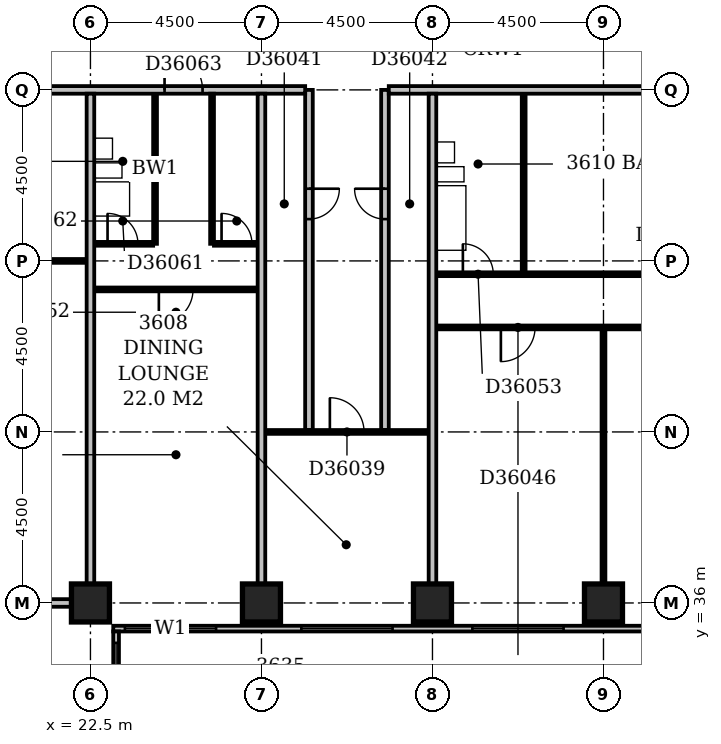
"""IFC4 building model, lengths in metres.
Left out: names, types, materials, properties, quantities, classifications, styles, units other than length and angle.
Written with IfcOpenShell. Run it as: python <this file> out.ifc"""

import sys

from ifc_helpers import new_model, si_unit, direction, frame, frame_2d, origin, origin_2d, place, context, subcontext, project, spatial, rectangle, extrude, element, fill, save


model = new_model("IFC4")
c1 = context("Model", 3, precision=1e-05, world=origin(), true_north=direction((0.0, 1.0)))
c2 = subcontext(c1, "Body", "Model", "MODEL_VIEW")
j1 = project(units=[si_unit("LENGTHUNIT", "METRE"), si_unit("PLANEANGLEUNIT", "RADIAN")], contexts=[c1])
p1 = place(None, origin())
s1 = spatial("IfcSite", under=j1, at=p1, CompositionType="ELEMENT")
p2 = place(p1, origin())
s2 = spatial("IfcBuilding", under=s1, at=p2, CompositionType="ELEMENT")
p3 = place(p2, frame((0.0, 0.0, 144.8)))
s3 = spatial("IfcBuildingStorey", under=s2, at=p3, CompositionType="ELEMENT", Elevation=144.8)
for number, where, z_axis, x_axis in (
    (1, (22.5, 36.0, -0.3), (0.0, 0.0, 1.0), (1.0, 0.0, 0.0)),
    (2, (27.0, 36.0, -0.3), (0.0, 0.0, 1.0), (1.0, 0.0, 0.0)),
    (3, (31.5, 36.0, -0.3), (0.0, 0.0, 1.0), (1.0, 0.0, 0.0)),
    (4, (36.0, 36.0, -0.3), (0.0, 0.0, 1.0), (1.0, 0.0, 0.0)),
):
    element("IfcColumn", number, at=place(p3, frame(where, z_axis=z_axis, x_axis=x_axis)), inside=s3, PredefinedType="COLUMN", context=c2, shape_type="SweptSolid", body=[
        extrude(rectangle(XDim=1.0, YDim=1.0, at=origin_2d()), origin(), (0.0, 0.0, 1.0), 3.6),
    ])
p4 = place(p3, frame((23.175, 17.4, 0.0), z_axis=(0.0, 0.0, 1.0), x_axis=(0.0, 1.0, 0.0)))
e5 = element("IfcWall", 5, at=p4, inside=s3, PredefinedType="STANDARD", context=c2, shape_type="SweptSolid", body=[
    extrude(rectangle(XDim=17.85, YDim=0.15, at=frame_2d((8.925, 0.0))), origin(), (0.0, 0.0, 1.0), 2.7),
])
p5 = place(p4, frame((1.432, 0.0, 0.6)))
e6 = element("IfcOpeningElement", 6, at=p5, cuts=e5, PredefinedType="OPENING", context=c2, shape_type="SweptSolid", body=[
    extrude(rectangle(XDim=2.4, YDim=1.8, at=frame_2d((1.2, 0.9))), frame((0.0, 0.087, 0.0), z_axis=(0.0, -1.0, 0.0), x_axis=(1.0, 0.0, 0.0)), (0.0, 0.0, 1.0), 0.174),
])
p6 = place(p4, frame((6.15, 0.0, 0.6)))
e7 = element("IfcOpeningElement", 7, at=p6, cuts=e5, PredefinedType="OPENING", context=c2, shape_type="SweptSolid", body=[
    extrude(rectangle(XDim=2.4, YDim=1.8, at=frame_2d((1.2, 0.9))), frame((0.0, 0.087, 0.0), z_axis=(0.0, -1.0, 0.0), x_axis=(1.0, 0.0, 0.0)), (0.0, 0.0, 1.0), 0.174),
])
p7 = place(p4, frame((10.65, 0.0, 0.6)))
e8 = element("IfcOpeningElement", 8, at=p7, cuts=e5, PredefinedType="OPENING", context=c2, shape_type="SweptSolid", body=[
    extrude(rectangle(XDim=2.4, YDim=1.8, at=frame_2d((1.2, 0.9))), frame((0.0, 0.087, 0.0), z_axis=(0.0, -1.0, 0.0), x_axis=(1.0, 0.0, 0.0)), (0.0, 0.0, 1.0), 0.174),
])
p8 = place(p4, frame((15.15, 0.0, 0.6)))
e9 = element("IfcOpeningElement", 9, at=p8, cuts=e5, PredefinedType="OPENING", context=c2, shape_type="SweptSolid", body=[
    extrude(rectangle(XDim=2.4, YDim=1.8, at=frame_2d((1.2, 0.9))), frame((0.0, 0.087, 0.0), z_axis=(0.0, -1.0, 0.0), x_axis=(1.0, 0.0, 0.0)), (0.0, 0.0, 1.0), 0.174),
])
p9 = place(p3, frame((23.1, 35.325, 0.0), z_axis=(0.0, 0.0, 1.0), x_axis=(1.0, 0.0, 0.0)))
e10 = element("IfcWall", 10, at=p9, inside=s3, PredefinedType="STANDARD", context=c2, shape_type="SweptSolid", body=[
    extrude(rectangle(XDim=45.15, YDim=0.15, at=frame_2d((22.575, 0.0))), origin(), (0.0, 0.0, 1.0), 2.7),
])
p10 = place(p9, frame((0.306, 0.0, 0.6)))
e11 = element("IfcOpeningElement", 11, at=p10, cuts=e10, PredefinedType="OPENING", context=c2, shape_type="SweptSolid", body=[
    extrude(rectangle(XDim=2.4, YDim=1.8, at=frame_2d((1.2, 0.9))), frame((0.0, 0.087, 0.0), z_axis=(0.0, -1.0, 0.0), x_axis=(1.0, 0.0, 0.0)), (0.0, 0.0, 1.0), 0.174),
])
p11 = place(p9, frame((4.95, 0.0, 0.6)))
e12 = element("IfcOpeningElement", 12, at=p11, cuts=e10, PredefinedType="OPENING", context=c2, shape_type="SweptSolid", body=[
    extrude(rectangle(XDim=2.4, YDim=1.8, at=frame_2d((1.2, 0.9))), frame((0.0, 0.087, 0.0), z_axis=(0.0, -1.0, 0.0), x_axis=(1.0, 0.0, 0.0)), (0.0, 0.0, 1.0), 0.174),
])
p12 = place(p9, frame((9.45, 0.0, 0.6)))
e13 = element("IfcOpeningElement", 13, at=p12, cuts=e10, PredefinedType="OPENING", context=c2, shape_type="SweptSolid", body=[
    extrude(rectangle(XDim=2.4, YDim=1.8, at=frame_2d((1.2, 0.9))), frame((0.0, 0.087, 0.0), z_axis=(0.0, -1.0, 0.0), x_axis=(1.0, 0.0, 0.0)), (0.0, 0.0, 1.0), 0.174),
])
p13 = place(p9, frame((13.95, 0.0, 0.6)))
e14 = element("IfcOpeningElement", 14, at=p13, cuts=e10, PredefinedType="OPENING", context=c2, shape_type="SweptSolid", body=[
    extrude(rectangle(XDim=2.4, YDim=1.8, at=frame_2d((1.2, 0.9))), frame((0.0, 0.087, 0.0), z_axis=(0.0, -1.0, 0.0), x_axis=(1.0, 0.0, 0.0)), (0.0, 0.0, 1.0), 0.174),
])
p14 = place(p9, frame((18.45, 0.0, 0.6)))
e15 = element("IfcOpeningElement", 15, at=p14, cuts=e10, PredefinedType="OPENING", context=c2, shape_type="SweptSolid", body=[
    extrude(rectangle(XDim=2.4, YDim=1.8, at=frame_2d((1.2, 0.9))), frame((0.0, 0.087, 0.0), z_axis=(0.0, -1.0, 0.0), x_axis=(1.0, 0.0, 0.0)), (0.0, 0.0, 1.0), 0.174),
])
p15 = place(p9, frame((23.84, 0.0, 0.6)))
e16 = element("IfcOpeningElement", 16, at=p15, cuts=e10, PredefinedType="OPENING", context=c2, shape_type="SweptSolid", body=[
    extrude(rectangle(XDim=1.8, YDim=1.8, at=frame_2d((0.9, 0.9))), frame((0.0, 0.087, 0.0), z_axis=(0.0, -1.0, 0.0), x_axis=(1.0, 0.0, 0.0)), (0.0, 0.0, 1.0), 0.174),
])
p16 = place(p9, frame((27.45, 0.0, 0.6)))
e17 = element("IfcOpeningElement", 17, at=p16, cuts=e10, PredefinedType="OPENING", context=c2, shape_type="SweptSolid", body=[
    extrude(rectangle(XDim=2.4, YDim=1.8, at=frame_2d((1.2, 0.9))), frame((0.0, 0.087, 0.0), z_axis=(0.0, -1.0, 0.0), x_axis=(1.0, 0.0, 0.0)), (0.0, 0.0, 1.0), 0.174),
])
p17 = place(p9, frame((32.27, 0.0, 0.6)))
e18 = element("IfcOpeningElement", 18, at=p17, cuts=e10, PredefinedType="OPENING", context=c2, shape_type="SweptSolid", body=[
    extrude(rectangle(XDim=2.4, YDim=1.8, at=frame_2d((1.2, 0.9))), frame((0.0, 0.087, 0.0), z_axis=(0.0, -1.0, 0.0), x_axis=(1.0, 0.0, 0.0)), (0.0, 0.0, 1.0), 0.174),
])
p18 = place(p9, frame((36.45, 0.0, 0.6)))
e19 = element("IfcOpeningElement", 19, at=p18, cuts=e10, PredefinedType="OPENING", context=c2, shape_type="SweptSolid", body=[
    extrude(rectangle(XDim=2.4, YDim=1.8, at=frame_2d((1.2, 0.9))), frame((0.0, 0.087, 0.0), z_axis=(0.0, -1.0, 0.0), x_axis=(1.0, 0.0, 0.0)), (0.0, 0.0, 1.0), 0.174),
])
p19 = place(p9, frame((40.95, 0.0, 0.6)))
e20 = element("IfcOpeningElement", 20, at=p19, cuts=e10, PredefinedType="OPENING", context=c2, shape_type="SweptSolid", body=[
    extrude(rectangle(XDim=2.4, YDim=1.8, at=frame_2d((1.2, 0.9))), frame((0.0, 0.087, 0.0), z_axis=(0.0, -1.0, 0.0), x_axis=(1.0, 0.0, 0.0)), (0.0, 0.0, 1.0), 0.174),
])
for number, where, z_axis, x_axis in (
    (21, (9.1, 36.0, 0.0), (0.0, 0.0, 1.0), (1.0, 0.0, 0.0)),
    (22, (22.5, 36.5, 0.0), (0.0, 0.0, 1.0), (0.0, 1.0, 0.0)),
):
    element("IfcWall", number, at=place(p3, frame(where, z_axis=z_axis, x_axis=x_axis)), inside=s3, PredefinedType="PARTITIONING", context=c2, shape_type="SweptSolid", body=[
        extrude(rectangle(XDim=12.9, YDim=0.2, at=frame_2d((6.45, 0.0))), origin(), (0.0, 0.0, 1.0), 3.3),
    ])
p20 = place(p3, frame((27.0, 36.5, 0.0), z_axis=(0.0, 0.0, 1.0), x_axis=(0.0, 1.0, 0.0)))
e23 = element("IfcWall", 23, at=p20, inside=s3, PredefinedType="PARTITIONING", context=c2, shape_type="SweptSolid", body=[
    extrude(rectangle(XDim=12.9, YDim=0.2, at=frame_2d((6.45, 0.0))), origin(), (0.0, 0.0, 1.0), 2.6),
])
p21 = place(p3, frame((31.5, 36.5, 0.0), z_axis=(0.0, 0.0, 1.0), x_axis=(0.0, 1.0, 0.0)))
e24 = element("IfcWall", 24, at=p21, inside=s3, PredefinedType="PARTITIONING", context=c2, shape_type="SweptSolid", body=[
    extrude(rectangle(XDim=12.9, YDim=0.2, at=frame_2d((6.45, 0.0))), origin(), (0.0, 0.0, 1.0), 3.3),
])
p22 = place(p3, frame((36.0, 36.5, 0.0), z_axis=(0.0, 0.0, 1.0), x_axis=(0.0, 1.0, 0.0)))
e25 = element("IfcWall", 25, at=p22, inside=s3, PredefinedType="PARTITIONING", context=c2, shape_type="SweptSolid", body=[
    extrude(rectangle(XDim=6.7, YDim=0.1, at=frame_2d((3.35, 0.0))), origin(), (0.0, 0.0, 1.0), 2.4),
])
p23 = place(p3, frame((27.1, 40.5, 0.0), z_axis=(0.0, 0.0, 1.0), x_axis=(1.0, 0.0, 0.0)))
e26 = element("IfcWall", 26, at=p23, inside=s3, PredefinedType="PARTITIONING", context=c2, shape_type="SweptSolid", body=[
    extrude(rectangle(XDim=4.3, YDim=0.1, at=frame_2d((2.15, 0.0))), origin(), (0.0, 0.0, 1.0), 3.3),
])
p24 = place(p23, frame((1.7, 0.0, 0.0)))
e27 = element("IfcOpeningElement", 27, at=p24, cuts=e26, PredefinedType="OPENING", context=c2, shape_type="SweptSolid", body=[
    extrude(rectangle(XDim=0.9, YDim=2.1, at=frame_2d((0.45, 1.05))), frame((0.0, 0.062, 0.0), z_axis=(0.0, -1.0, 0.0), x_axis=(1.0, 0.0, 0.0)), (0.0, 0.0, 1.0), 0.124),
])
p25 = place(p3, frame((28.25, 40.55, 0.0), z_axis=(0.0, 0.0, 1.0), x_axis=(0.0, 1.0, 0.0)))
e28 = element("IfcWall", 28, at=p25, inside=s3, PredefinedType="PARTITIONING", context=c2, shape_type="SweptSolid", body=[
    extrude(rectangle(XDim=8.95, YDim=0.2, at=frame_2d((4.475, 0.0))), origin(), (0.0, 0.0, 1.0), 3.3),
])
p26 = place(p25, frame((5.55, 0.0, 0.0)))
e29 = element("IfcOpeningElement", 29, at=p26, cuts=e28, PredefinedType="OPENING", context=c2, shape_type="SweptSolid", body=[
    extrude(rectangle(XDim=0.8, YDim=2.1, at=frame_2d((0.4, 1.05))), frame((0.0, 0.112, 0.0), z_axis=(0.0, -1.0, 0.0), x_axis=(1.0, 0.0, 0.0)), (0.0, 0.0, 1.0), 0.224),
])
p27 = place(p3, frame((30.25, 40.55, 0.0), z_axis=(0.0, 0.0, 1.0), x_axis=(0.0, 1.0, 0.0)))
e30 = element("IfcWall", 30, at=p27, inside=s3, PredefinedType="PARTITIONING", context=c2, shape_type="SweptSolid", body=[
    extrude(rectangle(XDim=8.95, YDim=0.2, at=frame_2d((4.475, 0.0))), origin(), (0.0, 0.0, 1.0), 3.3),
])
p28 = place(p27, frame((5.55, 0.0, 0.0)))
e31 = element("IfcOpeningElement", 31, at=p28, cuts=e30, PredefinedType="OPENING", context=c2, shape_type="SweptSolid", body=[
    extrude(rectangle(XDim=0.8, YDim=2.1, at=frame_2d((0.4, 1.05))), frame((0.0, 0.112, 0.0), z_axis=(0.0, -1.0, 0.0), x_axis=(1.0, 0.0, 0.0)), (0.0, 0.0, 1.0), 0.224),
])
p29 = place(p3, frame((31.6, 43.25, 0.0), z_axis=(0.0, 0.0, 1.0), x_axis=(1.0, 0.0, 0.0)))
e32 = element("IfcWall", 32, at=p29, inside=s3, PredefinedType="PARTITIONING", context=c2, shape_type="SweptSolid", body=[
    extrude(rectangle(XDim=13.3, YDim=0.1, at=frame_2d((6.65, 0.0))), origin(), (0.0, 0.0, 1.0), 3.3),
])
p30 = place(p29, frame((1.7, 0.0, 0.0)))
e33 = element("IfcOpeningElement", 33, at=p30, cuts=e32, PredefinedType="OPENING", context=c2, shape_type="SweptSolid", body=[
    extrude(rectangle(XDim=0.9, YDim=2.1, at=frame_2d((0.45, 1.05))), frame((0.0, 0.062, 0.0), z_axis=(0.0, -1.0, 0.0), x_axis=(1.0, 0.0, 0.0)), (0.0, 0.0, 1.0), 0.124),
])
p31 = place(p29, frame((6.2, 0.0, 0.0)))
e34 = element("IfcOpeningElement", 34, at=p31, cuts=e32, PredefinedType="OPENING", context=c2, shape_type="SweptSolid", body=[
    extrude(rectangle(XDim=0.9, YDim=2.1, at=frame_2d((0.45, 1.05))), frame((0.0, 0.062, 0.0), z_axis=(0.0, -1.0, 0.0), x_axis=(1.0, 0.0, 0.0)), (0.0, 0.0, 1.0), 0.124),
])
p32 = place(p29, frame((10.7, 0.0, 0.0)))
e35 = element("IfcOpeningElement", 35, at=p32, cuts=e32, PredefinedType="OPENING", context=c2, shape_type="SweptSolid", body=[
    extrude(rectangle(XDim=0.9, YDim=2.1, at=frame_2d((0.45, 1.05))), frame((0.0, 0.062, 0.0), z_axis=(0.0, -1.0, 0.0), x_axis=(1.0, 0.0, 0.0)), (0.0, 0.0, 1.0), 0.124),
])
p33 = place(p3, frame((22.6, 44.25, 0.0), z_axis=(0.0, 0.0, 1.0), x_axis=(1.0, 0.0, 0.0)))
e36 = element("IfcWall", 36, at=p33, inside=s3, PredefinedType="PARTITIONING", context=c2, shape_type="SweptSolid", body=[
    extrude(rectangle(XDim=4.3, YDim=0.1, at=frame_2d((2.15, 0.0))), origin(), (0.0, 0.0, 1.0), 3.3),
])
p34 = place(p33, frame((1.7, 0.0, 0.0)))
e37 = element("IfcOpeningElement", 37, at=p34, cuts=e36, PredefinedType="OPENING", context=c2, shape_type="SweptSolid", body=[
    extrude(rectangle(XDim=0.9, YDim=2.1, at=frame_2d((0.45, 1.05))), frame((0.0, 0.062, 0.0), z_axis=(0.0, -1.0, 0.0), x_axis=(1.0, 0.0, 0.0)), (0.0, 0.0, 1.0), 0.124),
])
p35 = place(p3, frame((31.6, 44.65, 0.0), z_axis=(0.0, 0.0, 1.0), x_axis=(1.0, 0.0, 0.0)))
e38 = element("IfcWall", 38, at=p35, inside=s3, PredefinedType="PARTITIONING", context=c2, shape_type="SweptSolid", body=[
    extrude(rectangle(XDim=10.15, YDim=0.1, at=frame_2d((5.075, 0.0))), origin(), (0.0, 0.0, 1.0), 3.3),
])
p36 = place(p35, frame((0.7, 0.0, 0.0)))
e39 = element("IfcOpeningElement", 39, at=p36, cuts=e38, PredefinedType="OPENING", context=c2, shape_type="SweptSolid", body=[
    extrude(rectangle(XDim=0.8, YDim=2.1, at=frame_2d((0.4, 1.05))), frame((0.0, 0.062, 0.0), z_axis=(0.0, -1.0, 0.0), x_axis=(1.0, 0.0, 0.0)), (0.0, 0.0, 1.0), 0.124),
])
p37 = place(p35, frame((5.8, 0.0, 0.0)))
e40 = element("IfcOpeningElement", 40, at=p37, cuts=e38, PredefinedType="OPENING", context=c2, shape_type="SweptSolid", body=[
    extrude(rectangle(XDim=0.9, YDim=2.1, at=frame_2d((0.45, 1.05))), frame((0.0, 0.062, 0.0), z_axis=(0.0, -1.0, 0.0), x_axis=(1.0, 0.0, 0.0)), (0.0, 0.0, 1.0), 0.124),
])
p38 = place(p3, frame((33.9, 44.7, 0.0), z_axis=(0.0, 0.0, 1.0), x_axis=(0.0, 1.0, 0.0)))
e41 = element("IfcWall", 41, at=p38, inside=s3, PredefinedType="PLUMBINGWALL", context=c2, shape_type="SweptSolid", body=[
    extrude(rectangle(XDim=4.7, YDim=0.1, at=frame_2d((2.35, 0.0))), origin(), (0.0, 0.0, 1.0), 3.3),
])
p39 = place(p3, frame((9.1, 45.0, 0.0), z_axis=(0.0, 0.0, 1.0), x_axis=(1.0, 0.0, 0.0)))
e42 = element("IfcWall", 42, at=p39, inside=s3, PredefinedType="PARTITIONING", context=c2, shape_type="SweptSolid", body=[
    extrude(rectangle(XDim=13.3, YDim=0.1, at=frame_2d((6.65, 0.0))), origin(), (0.0, 0.0, 1.0), 3.3),
])
p40 = place(p3, frame((22.6, 45.45, 0.0), z_axis=(0.0, 0.0, 1.0), x_axis=(1.0, 0.0, 0.0)))
e43 = element("IfcWall", 43, at=p40, inside=s3, PredefinedType="PARTITIONING", context=c2, shape_type="SweptSolid", body=[
    extrude(rectangle(XDim=1.55, YDim=0.1, at=frame_2d((0.775, 0.0))), origin(), (0.0, 0.0, 1.0), 3.3),
])
p41 = place(p40, frame((0.35, 0.0, 0.0)))
e44 = element("IfcOpeningElement", 44, at=p41, cuts=e43, PredefinedType="OPENING", context=c2, shape_type="SweptSolid", body=[
    extrude(rectangle(XDim=0.8, YDim=2.1, at=frame_2d((0.4, 1.05))), frame((0.0, 0.062, 0.0), z_axis=(0.0, -1.0, 0.0), x_axis=(1.0, 0.0, 0.0)), (0.0, 0.0, 1.0), 0.124),
])
p42 = place(p3, frame((24.2, 45.45, 0.0), z_axis=(0.0, 0.0, 1.0), x_axis=(0.0, 1.0, 0.0)))
e45 = element("IfcWall", 45, at=p42, inside=s3, PredefinedType="PLUMBINGWALL", context=c2, shape_type="SweptSolid", body=[
    extrude(rectangle(XDim=3.95, YDim=0.1, at=frame_2d((1.975, 0.0))), origin(), (0.0, 0.0, 1.0), 3.3),
])
p43 = place(p3, frame((25.7, 45.45, 0.0), z_axis=(0.0, 0.0, 1.0), x_axis=(0.0, 1.0, 0.0)))
e46 = element("IfcWall", 46, at=p43, inside=s3, PredefinedType="PARTITIONING", context=c2, shape_type="SweptSolid", body=[
    extrude(rectangle(XDim=3.95, YDim=0.1, at=frame_2d((1.975, 0.0))), origin(), (0.0, 0.0, 1.0), 3.3),
])
p44 = place(p3, frame((25.75, 45.45, 0.0), z_axis=(0.0, 0.0, 1.0), x_axis=(1.0, 0.0, 0.0)))
e47 = element("IfcWall", 47, at=p44, inside=s3, PredefinedType="PARTITIONING", context=c2, shape_type="SweptSolid", body=[
    extrude(rectangle(XDim=1.15, YDim=0.1, at=frame_2d((0.575, 0.0))), origin(), (0.0, 0.0, 1.0), 3.3),
])
p45 = place(p44, frame((0.2, 0.0, 0.0)))
e48 = element("IfcOpeningElement", 48, at=p45, cuts=e47, PredefinedType="OPENING", context=c2, shape_type="SweptSolid", body=[
    extrude(rectangle(XDim=0.8, YDim=2.1, at=frame_2d((0.4, 1.05))), frame((0.0, 0.062, 0.0), z_axis=(0.0, -1.0, 0.0), x_axis=(1.0, 0.0, 0.0)), (0.0, 0.0, 1.0), 0.124),
])
p46 = place(p3, frame((9.1, 49.5, 0.0), z_axis=(0.0, 0.0, 1.0), x_axis=(1.0, 0.0, 0.0)))
e49 = element("IfcWall", 49, at=p46, inside=s3, PredefinedType="PARTITIONING", context=c2, shape_type="SweptSolid", body=[
    extrude(rectangle(XDim=19.05, YDim=0.2, at=frame_2d((9.525, 0.0))), origin(), (0.0, 0.0, 1.0), 3.3),
])
p47 = place(p46, frame((15.35, 0.0, 0.0)))
e50 = element("IfcOpeningElement", 50, at=p47, cuts=e49, PredefinedType="OPENING", context=c2, shape_type="SweptSolid", body=[
    extrude(rectangle(XDim=1.0, YDim=2.1, at=frame_2d((0.5, 1.05))), frame((0.0, 0.112, 0.0), z_axis=(0.0, -1.0, 0.0), x_axis=(1.0, 0.0, 0.0)), (0.0, 0.0, 1.0), 0.224),
])
p48 = place(p46, frame((6.15, 0.0, 0.0)))
e51 = element("IfcOpeningElement", 51, at=p48, cuts=e49, PredefinedType="OPENING", context=c2, shape_type="SweptSolid", body=[
    extrude(rectangle(XDim=0.9, YDim=2.1, at=frame_2d((0.45, 1.05))), frame((0.0, 0.112, 0.0), z_axis=(0.0, -1.0, 0.0), x_axis=(1.0, 0.0, 0.0)), (0.0, 0.0, 1.0), 0.224),
])
p49 = place(p3, frame((30.35, 49.5, 0.0), z_axis=(0.0, 0.0, 1.0), x_axis=(1.0, 0.0, 0.0)))
e52 = element("IfcWall", 52, at=p49, inside=s3, PredefinedType="PARTITIONING", context=c2, shape_type="SweptSolid", body=[
    extrude(rectangle(XDim=15.8, YDim=0.2, at=frame_2d((7.9, 0.0))), origin(), (0.0, 0.0, 1.0), 3.3),
])
p50 = place(p49, frame((11.75, 0.0, 0.0)))
e53 = element("IfcOpeningElement", 53, at=p50, cuts=e52, PredefinedType="OPENING", context=c2, shape_type="SweptSolid", body=[
    extrude(rectangle(XDim=1.0, YDim=2.1, at=frame_2d((0.5, 1.05))), frame((0.0, 0.112, 0.0), z_axis=(0.0, -1.0, 0.0), x_axis=(1.0, 0.0, 0.0)), (0.0, 0.0, 1.0), 0.224),
])
p51 = place(p8, origin())
e54 = element("IfcWindow", 54, at=p51, inside=s3, PartitioningType="SINGLE_PANEL", PredefinedType="WINDOW", context=c2, shape_type="SweptSolid", body=[
    extrude(rectangle(XDim=2.4, YDim=1.8, at=frame_2d((1.2, 0.9))), frame((0.0, 0.03, 0.0), z_axis=(0.0, -1.0, 0.0), x_axis=(1.0, 0.0, 0.0)), (0.0, 0.0, 1.0), 0.06),
])
fill(e9, e54)
p52 = place(p10, origin())
e55 = element("IfcWindow", 55, at=p52, inside=s3, PartitioningType="SINGLE_PANEL", PredefinedType="WINDOW", context=c2, shape_type="SweptSolid", body=[
    extrude(rectangle(XDim=2.4, YDim=1.8, at=frame_2d((1.2, 0.9))), frame((0.0, 0.03, 0.0), z_axis=(0.0, -1.0, 0.0), x_axis=(1.0, 0.0, 0.0)), (0.0, 0.0, 1.0), 0.06),
])
fill(e11, e55)
p53 = place(p11, origin())
e56 = element("IfcWindow", 56, at=p53, inside=s3, PartitioningType="SINGLE_PANEL", PredefinedType="WINDOW", context=c2, shape_type="SweptSolid", body=[
    extrude(rectangle(XDim=2.4, YDim=1.8, at=frame_2d((1.2, 0.9))), frame((0.0, 0.03, 0.0), z_axis=(0.0, -1.0, 0.0), x_axis=(1.0, 0.0, 0.0)), (0.0, 0.0, 1.0), 0.06),
])
fill(e12, e56)
p54 = place(p12, origin())
e57 = element("IfcWindow", 57, at=p54, inside=s3, PartitioningType="SINGLE_PANEL", PredefinedType="WINDOW", context=c2, shape_type="SweptSolid", body=[
    extrude(rectangle(XDim=2.4, YDim=1.8, at=frame_2d((1.2, 0.9))), frame((0.0, 0.03, 0.0), z_axis=(0.0, -1.0, 0.0), x_axis=(1.0, 0.0, 0.0)), (0.0, 0.0, 1.0), 0.06),
])
fill(e13, e57)
p55 = place(p24, origin())
e58 = element("IfcDoor", 58, at=p55, inside=s3, OperationType="SINGLE_SWING_LEFT", PredefinedType="DOOR", context=c2, shape_type="SweptSolid", body=[
    extrude(rectangle(XDim=0.9, YDim=2.1, at=frame_2d((0.45, 1.05))), frame((0.0, 0.025, 0.0), z_axis=(0.0, -1.0, 0.0), x_axis=(1.0, 0.0, 0.0)), (0.0, 0.0, 1.0), 0.05),
])
fill(e27, e58)
p56 = place(p26, origin())
e59 = element("IfcDoor", 59, at=p56, inside=s3, OperationType="SINGLE_SWING_RIGHT", PredefinedType="DOOR", context=c2, shape_type="SweptSolid", body=[
    extrude(rectangle(XDim=0.8, YDim=2.1, at=frame_2d((0.4, 1.05))), frame((0.0, 0.025, 0.0), z_axis=(0.0, -1.0, 0.0), x_axis=(1.0, 0.0, 0.0)), (0.0, 0.0, 1.0), 0.05),
])
fill(e29, e59)
p57 = place(p28, frame((0.8, 0.0, 0.0), z_axis=(0.0, 0.0, 1.0), x_axis=(-1.0, 0.0, 0.0)))
e60 = element("IfcDoor", 60, at=p57, inside=s3, OperationType="SINGLE_SWING_LEFT", PredefinedType="DOOR", context=c2, shape_type="SweptSolid", body=[
    extrude(rectangle(XDim=0.8, YDim=2.1, at=frame_2d((0.4, 1.05))), frame((0.0, 0.025, 0.0), z_axis=(0.0, -1.0, 0.0), x_axis=(1.0, 0.0, 0.0)), (0.0, 0.0, 1.0), 0.05),
])
fill(e31, e60)
p58 = place(p30, frame((0.9, 0.0, 0.0), z_axis=(0.0, 0.0, 1.0), x_axis=(-1.0, 0.0, 0.0)))
e61 = element("IfcDoor", 61, at=p58, inside=s3, OperationType="SINGLE_SWING_RIGHT", PredefinedType="DOOR", context=c2, shape_type="SweptSolid", body=[
    extrude(rectangle(XDim=0.9, YDim=2.1, at=frame_2d((0.45, 1.05))), frame((0.0, 0.025, 0.0), z_axis=(0.0, -1.0, 0.0), x_axis=(1.0, 0.0, 0.0)), (0.0, 0.0, 1.0), 0.05),
])
fill(e33, e61)
p59 = place(p34, frame((0.9, 0.0, 0.0), z_axis=(0.0, 0.0, 1.0), x_axis=(-1.0, 0.0, 0.0)))
e62 = element("IfcDoor", 62, at=p59, inside=s3, OperationType="SINGLE_SWING_RIGHT", PredefinedType="DOOR", context=c2, shape_type="SweptSolid", body=[
    extrude(rectangle(XDim=0.9, YDim=2.1, at=frame_2d((0.45, 1.05))), frame((0.0, 0.025, 0.0), z_axis=(0.0, -1.0, 0.0), x_axis=(1.0, 0.0, 0.0)), (0.0, 0.0, 1.0), 0.05),
])
fill(e37, e62)
p60 = place(p36, origin())
e63 = element("IfcDoor", 63, at=p60, inside=s3, OperationType="SINGLE_SWING_LEFT", PredefinedType="DOOR", context=c2, shape_type="SweptSolid", body=[
    extrude(rectangle(XDim=0.8, YDim=2.1, at=frame_2d((0.4, 1.05))), frame((0.0, 0.025, 0.0), z_axis=(0.0, -1.0, 0.0), x_axis=(1.0, 0.0, 0.0)), (0.0, 0.0, 1.0), 0.05),
])
fill(e39, e63)
p61 = place(p41, origin())
e64 = element("IfcDoor", 64, at=p61, inside=s3, OperationType="SINGLE_SWING_LEFT", PredefinedType="DOOR", context=c2, shape_type="SweptSolid", body=[
    extrude(rectangle(XDim=0.8, YDim=2.1, at=frame_2d((0.4, 1.05))), frame((0.0, 0.025, 0.0), z_axis=(0.0, -1.0, 0.0), x_axis=(1.0, 0.0, 0.0)), (0.0, 0.0, 1.0), 0.05),
])
fill(e44, e64)
p62 = place(p45, origin())
e65 = element("IfcDoor", 65, at=p62, inside=s3, OperationType="SINGLE_SWING_LEFT", PredefinedType="DOOR", context=c2, shape_type="SweptSolid", body=[
    extrude(rectangle(XDim=0.8, YDim=2.1, at=frame_2d((0.4, 1.05))), frame((0.0, 0.025, 0.0), z_axis=(0.0, -1.0, 0.0), x_axis=(1.0, 0.0, 0.0)), (0.0, 0.0, 1.0), 0.05),
])
fill(e48, e65)
p63 = place(p47, origin())
e66 = element("IfcDoor", 66, at=p63, inside=s3, OperationType="SINGLE_SWING_LEFT", PredefinedType="DOOR", context=c2, shape_type="SweptSolid", body=[
    extrude(rectangle(XDim=1.0, YDim=2.1, at=frame_2d((0.5, 1.05))), frame((0.0, 0.025, 0.0), z_axis=(0.0, -1.0, 0.0), x_axis=(1.0, 0.0, 0.0)), (0.0, 0.0, 1.0), 0.05),
])
fill(e50, e66)
save(model, sys.argv[1])
